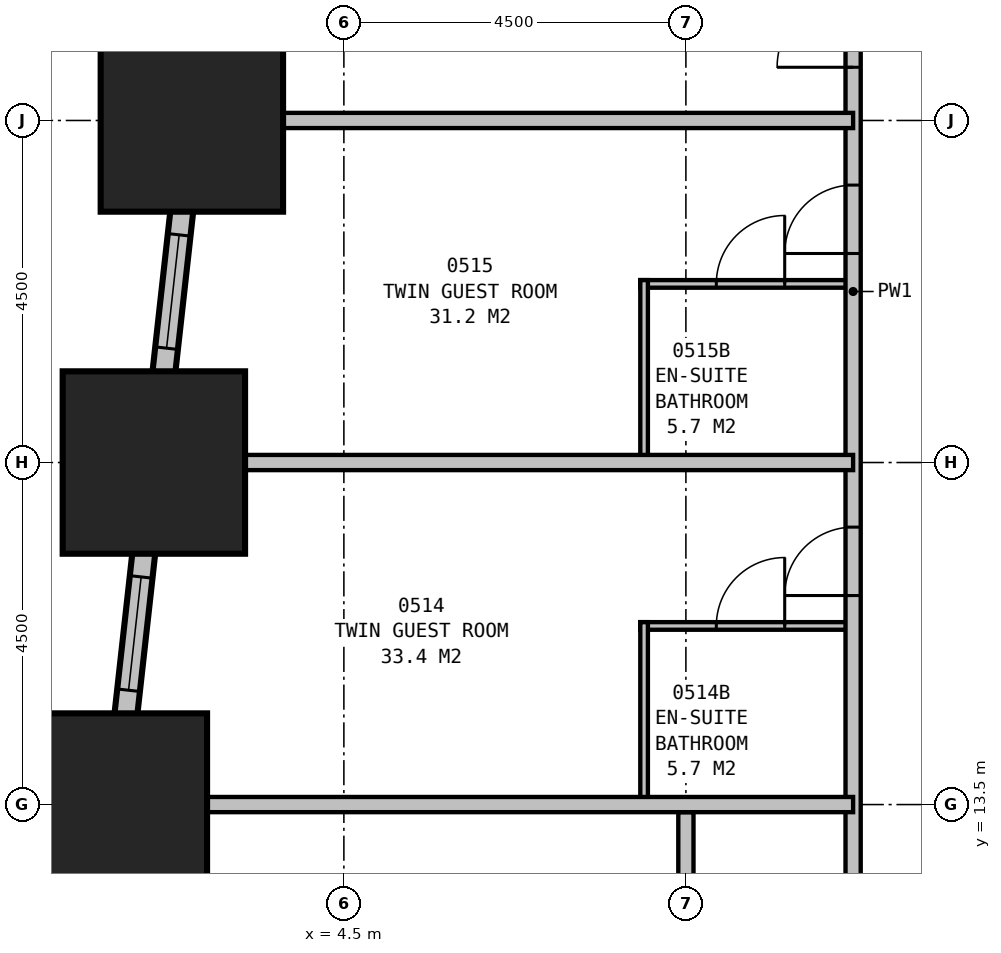
"""IFC4 building model, lengths in metres.
Left out: names, types, materials, properties, quantities, classifications, styles, units other than length and angle.
Written with IfcOpenShell. Run it as: python <this file> out.ifc"""

import sys

from ifc_helpers import new_model, si_unit, direction, frame, frame_2d, origin, origin_2d, place, context, subcontext, project, spatial, rectangle, extrude, element, fill, save


model = new_model("IFC4")
c1 = context("Model", 3, precision=1e-05, world=origin(), true_north=direction((0.0, 1.0)))
c2 = subcontext(c1, "Body", "Model", "MODEL_VIEW")
j1 = project(units=[si_unit("LENGTHUNIT", "METRE"), si_unit("PLANEANGLEUNIT", "RADIAN")], contexts=[c1])
p1 = place(None, origin())
s1 = spatial("IfcSite", under=j1, at=p1, CompositionType="ELEMENT")
p2 = place(p1, origin())
s2 = spatial("IfcBuilding", under=s1, at=p2, CompositionType="ELEMENT")
p3 = place(p2, frame((0.0, 0.0, 29.7)))
s3 = spatial("IfcBuildingStorey", under=s2, at=p3, CompositionType="ELEMENT", Elevation=29.7)
for number, where, z_axis, x_axis in (
    (1, (2.5, 22.5, 0.0), (0.0, 0.0, 1.0), (1.0, 0.0, 0.0)),
    (2, (2.0, 18.0, 0.0), (0.0, 0.0, 1.0), (1.0, 0.0, 0.0)),
    (3, (1.5, 13.5, 0.0), (0.0, 0.0, 1.0), (1.0, 0.0, 0.0)),
):
    element("IfcColumn", number, at=place(p3, frame(where, z_axis=z_axis, x_axis=x_axis)), inside=s3, PredefinedType="COLUMN", context=c2, shape_type="SweptSolid", body=[
        extrude(rectangle(XDim=2.4, YDim=2.4, at=origin_2d()), origin(), (0.0, 0.0, 1.0), 3.5),
    ])
p4 = place(p3, frame((4.017, 36.149, 0.0), z_axis=(0.0, 0.0, 1.0), x_axis=(-0.110433201132, -0.993883548555, 0.0)))
e4 = element("IfcWall", 4, at=p4, inside=s3, PredefinedType="STANDARD", context=c2, shape_type="SweptSolid", body=[
    extrude(rectangle(XDim=31.994, YDim=0.3, at=frame_2d((15.997, 0.0))), origin(), (0.0, 0.0, 1.0), 2.05),
])
p5 = place(p4, frame((1.664, 0.0, 0.5)))
e5 = element("IfcOpeningElement", 5, at=p5, cuts=e4, PredefinedType="OPENING", context=c2, shape_type="SweptSolid", body=[
    extrude(rectangle(XDim=1.5, YDim=1.4, at=frame_2d((0.75, 0.7))), frame((0.0, 0.16, 0.0), z_axis=(0.0, -1.0, 0.0), x_axis=(1.0, 0.0, 0.0)), (0.0, 0.0, 1.0), 0.32),
])
p6 = place(p4, frame((6.192, 0.0, 0.5)))
e6 = element("IfcOpeningElement", 6, at=p6, cuts=e4, PredefinedType="OPENING", context=c2, shape_type="SweptSolid", body=[
    extrude(rectangle(XDim=1.5, YDim=1.4, at=frame_2d((0.75, 0.7))), frame((0.0, 0.16, 0.0), z_axis=(0.0, -1.0, 0.0), x_axis=(1.0, 0.0, 0.0)), (0.0, 0.0, 1.0), 0.32),
])
p7 = place(p4, frame((10.719, 0.0, 0.5)))
e7 = element("IfcOpeningElement", 7, at=p7, cuts=e4, PredefinedType="OPENING", context=c2, shape_type="SweptSolid", body=[
    extrude(rectangle(XDim=1.5, YDim=1.4, at=frame_2d((0.75, 0.7))), frame((0.0, 0.16, 0.0), z_axis=(0.0, -1.0, 0.0), x_axis=(1.0, 0.0, 0.0)), (0.0, 0.0, 1.0), 0.32),
])
p8 = place(p4, frame((15.247, 0.0, 0.5)))
e8 = element("IfcOpeningElement", 8, at=p8, cuts=e4, PredefinedType="OPENING", context=c2, shape_type="SweptSolid", body=[
    extrude(rectangle(XDim=1.5, YDim=1.4, at=frame_2d((0.75, 0.7))), frame((0.0, 0.16, 0.0), z_axis=(0.0, -1.0, 0.0), x_axis=(1.0, 0.0, 0.0)), (0.0, 0.0, 1.0), 0.32),
])
p9 = place(p4, frame((19.775, 0.0, 0.5)))
e9 = element("IfcOpeningElement", 9, at=p9, cuts=e4, PredefinedType="OPENING", context=c2, shape_type="SweptSolid", body=[
    extrude(rectangle(XDim=1.5, YDim=1.4, at=frame_2d((0.75, 0.7))), frame((0.0, 0.16, 0.0), z_axis=(0.0, -1.0, 0.0), x_axis=(1.0, 0.0, 0.0)), (0.0, 0.0, 1.0), 0.32),
])
p10 = place(p4, frame((24.302, 0.0, 0.5)))
e10 = element("IfcOpeningElement", 10, at=p10, cuts=e4, PredefinedType="OPENING", context=c2, shape_type="SweptSolid", body=[
    extrude(rectangle(XDim=1.5, YDim=1.4, at=frame_2d((0.75, 0.7))), frame((0.0, 0.16, 0.0), z_axis=(0.0, -1.0, 0.0), x_axis=(1.0, 0.0, 0.0)), (0.0, 0.0, 1.0), 0.32),
])
p11 = place(p4, frame((28.83, 0.0, 0.5)))
e11 = element("IfcOpeningElement", 11, at=p11, cuts=e4, PredefinedType="OPENING", context=c2, shape_type="SweptSolid", body=[
    extrude(rectangle(XDim=1.5, YDim=1.4, at=frame_2d((0.75, 0.7))), frame((0.0, 0.16, 0.0), z_axis=(0.0, -1.0, 0.0), x_axis=(1.0, 0.0, 0.0)), (0.0, 0.0, 1.0), 0.32),
])
p12 = place(p3, frame((11.2, 11.2, 0.0), z_axis=(0.0, 0.0, 1.0), x_axis=(0.0, 1.0, 0.0)))
e12 = element("IfcWall", 12, at=p12, inside=s3, PredefinedType="PARTITIONING", context=c2, shape_type="SweptSolid", body=[
    extrude(rectangle(XDim=18.1, YDim=0.2, at=frame_2d((9.05, 0.0))), origin(), (0.0, 0.0, 1.0), 3.25),
])
p13 = place(p12, frame((5.05, 0.0, 0.0)))
e13 = element("IfcOpeningElement", 13, at=p13, cuts=e12, PredefinedType="OPENING", context=c2, shape_type="SweptSolid", body=[
    extrude(rectangle(XDim=0.9, YDim=2.1, at=frame_2d((0.45, 1.05))), frame((0.0, 0.11, 0.0), z_axis=(0.0, -1.0, 0.0), x_axis=(1.0, 0.0, 0.0)), (0.0, 0.0, 1.0), 0.22),
])
p14 = place(p12, frame((9.55, 0.0, 0.0)))
e14 = element("IfcOpeningElement", 14, at=p14, cuts=e12, PredefinedType="OPENING", context=c2, shape_type="SweptSolid", body=[
    extrude(rectangle(XDim=0.9, YDim=2.1, at=frame_2d((0.45, 1.05))), frame((0.0, 0.11, 0.0), z_axis=(0.0, -1.0, 0.0), x_axis=(1.0, 0.0, 0.0)), (0.0, 0.0, 1.0), 0.22),
])
p15 = place(p12, frame((12.0, 0.0, 0.0)))
e15 = element("IfcOpeningElement", 15, at=p15, cuts=e12, PredefinedType="OPENING", context=c2, shape_type="SweptSolid", body=[
    extrude(rectangle(XDim=1.0, YDim=2.1, at=frame_2d((0.5, 1.05))), frame((0.0, 0.11, 0.0), z_axis=(0.0, -1.0, 0.0), x_axis=(1.0, 0.0, 0.0)), (0.0, 0.0, 1.0), 0.22),
])
p16 = place(p3, frame((11.2, 18.0, 0.0), z_axis=(0.0, 0.0, 1.0), x_axis=(-1.0, 0.0, 0.0)))
e16 = element("IfcWall", 16, at=p16, inside=s3, PredefinedType="PARTITIONING", context=c2, shape_type="SweptSolid", body=[
    extrude(rectangle(XDim=9.199, YDim=0.2, at=frame_2d((4.6, 0.0))), origin(), (0.0, 0.0, 1.0), 2.25),
])
p17 = place(p3, frame((11.2, 22.5, 0.0), z_axis=(0.0, 0.0, 1.0), x_axis=(-1.0, 0.0, 0.0)))
e17 = element("IfcWall", 17, at=p17, inside=s3, PredefinedType="PARTITIONING", context=c2, shape_type="SweptSolid", body=[
    extrude(rectangle(XDim=8.699, YDim=0.2, at=frame_2d((4.35, 0.0))), origin(), (0.0, 0.0, 1.0), 2.25),
])
p18 = place(p3, frame((8.45, 13.5, 0.0), z_axis=(0.0, 0.0, 1.0), x_axis=(0.0, 1.0, 0.0)))
e18 = element("IfcWall", 18, at=p18, inside=s3, PredefinedType="PLUMBINGWALL", context=c2, shape_type="SweptSolid", body=[
    extrude(rectangle(XDim=2.4, YDim=0.1, at=frame_2d((1.2, 0.0))), origin(), (0.0, 0.0, 1.0), 3.25),
])
p19 = place(p3, frame((11.2, 15.85, 0.0), z_axis=(0.0, 0.0, 1.0), x_axis=(-1.0, 0.0, 0.0)))
e19 = element("IfcWall", 19, at=p19, inside=s3, PredefinedType="PLUMBINGWALL", context=c2, shape_type="SweptSolid", body=[
    extrude(rectangle(XDim=2.8, YDim=0.1, at=frame_2d((1.4, 0.0))), origin(), (0.0, 0.0, 1.0), 3.25),
])
p20 = place(p19, frame((1.8, 0.0, 0.0), z_axis=(0.0, 0.0, 1.0), x_axis=(-1.0, 0.0, 0.0)))
e20 = element("IfcOpeningElement", 20, at=p20, cuts=e19, PredefinedType="OPENING", context=c2, shape_type="SweptSolid", body=[
    extrude(rectangle(XDim=0.9, YDim=2.1, at=frame_2d((0.45, 1.05))), frame((0.0, 0.06, 0.0), z_axis=(0.0, -1.0, 0.0), x_axis=(1.0, 0.0, 0.0)), (0.0, 0.0, 1.0), 0.12),
])
p21 = place(p3, frame((8.45, 18.0, 0.0), z_axis=(0.0, 0.0, 1.0), x_axis=(0.0, 1.0, 0.0)))
e21 = element("IfcWall", 21, at=p21, inside=s3, PredefinedType="PLUMBINGWALL", context=c2, shape_type="SweptSolid", body=[
    extrude(rectangle(XDim=2.4, YDim=0.1, at=frame_2d((1.2, 0.0))), origin(), (0.0, 0.0, 1.0), 3.25),
])
p22 = place(p3, frame((11.2, 20.35, 0.0), z_axis=(0.0, 0.0, 1.0), x_axis=(-1.0, 0.0, 0.0)))
e22 = element("IfcWall", 22, at=p22, inside=s3, PredefinedType="PLUMBINGWALL", context=c2, shape_type="SweptSolid", body=[
    extrude(rectangle(XDim=2.8, YDim=0.1, at=frame_2d((1.4, 0.0))), origin(), (0.0, 0.0, 1.0), 3.25),
])
p23 = place(p22, frame((1.8, 0.0, 0.0), z_axis=(0.0, 0.0, 1.0), x_axis=(-1.0, 0.0, 0.0)))
e23 = element("IfcOpeningElement", 23, at=p23, cuts=e22, PredefinedType="OPENING", context=c2, shape_type="SweptSolid", body=[
    extrude(rectangle(XDim=0.9, YDim=2.1, at=frame_2d((0.45, 1.05))), frame((0.0, 0.06, 0.0), z_axis=(0.0, -1.0, 0.0), x_axis=(1.0, 0.0, 0.0)), (0.0, 0.0, 1.0), 0.12),
])
p24 = place(p3, frame((11.2, 13.5, 0.0), z_axis=(0.0, 0.0, 1.0), x_axis=(-1.0, 0.0, 0.0)))
e24 = element("IfcWall", 24, at=p24, inside=s3, PredefinedType="PARTITIONING", context=c2, shape_type="SweptSolid", body=[
    extrude(rectangle(XDim=9.921, YDim=0.2, at=frame_2d((4.96, 0.0))), origin(), (0.0, 0.0, 1.0), 1.95),
])
p25 = place(p3, frame((9.0, 4.6, 0.0), z_axis=(0.0, 0.0, 1.0), x_axis=(0.0, 1.0, 0.0)))
e25 = element("IfcWall", 25, at=p25, inside=s3, PredefinedType="PARTITIONING", context=c2, shape_type="SweptSolid", body=[
    extrude(rectangle(XDim=8.8, YDim=0.2, at=frame_2d((4.4, 0.0))), origin(), (0.0, 0.0, 1.0), 2.25),
])
p26 = place(p25, frame((4.05, 0.0, 0.0)))
e26 = element("IfcOpeningElement", 26, at=p26, cuts=e25, PredefinedType="OPENING", context=c2, shape_type="SweptSolid", body=[
    extrude(rectangle(XDim=0.9, YDim=2.1, at=frame_2d((0.45, 1.05))), frame((0.0, 0.11, 0.0), z_axis=(0.0, -1.0, 0.0), x_axis=(1.0, 0.0, 0.0)), (0.0, 0.0, 1.0), 0.22),
])
p27 = place(p8, origin())
e27 = element("IfcWindow", 27, at=p27, inside=s3, PartitioningType="SINGLE_PANEL", PredefinedType="WINDOW", context=c2, shape_type="SweptSolid", body=[
    extrude(rectangle(XDim=1.5, YDim=1.4, at=frame_2d((0.75, 0.7))), frame((0.0, 0.03, 0.0), z_axis=(0.0, -1.0, 0.0), x_axis=(1.0, 0.0, 0.0)), (0.0, 0.0, 1.0), 0.06),
])
fill(e8, e27)
p28 = place(p9, origin())
e28 = element("IfcWindow", 28, at=p28, inside=s3, PartitioningType="SINGLE_PANEL", PredefinedType="WINDOW", context=c2, shape_type="SweptSolid", body=[
    extrude(rectangle(XDim=1.5, YDim=1.4, at=frame_2d((0.75, 0.7))), frame((0.0, 0.03, 0.0), z_axis=(0.0, -1.0, 0.0), x_axis=(1.0, 0.0, 0.0)), (0.0, 0.0, 1.0), 0.06),
])
fill(e9, e28)
p29 = place(p13, origin())
e29 = element("IfcDoor", 29, at=p29, inside=s3, OperationType="SINGLE_SWING_LEFT", PredefinedType="DOOR", context=c2, shape_type="SweptSolid", body=[
    extrude(rectangle(XDim=0.9, YDim=2.1, at=frame_2d((0.45, 1.05))), frame((0.0, 0.025, 0.0), z_axis=(0.0, -1.0, 0.0), x_axis=(1.0, 0.0, 0.0)), (0.0, 0.0, 1.0), 0.05),
])
fill(e13, e29)
p30 = place(p14, origin())
e30 = element("IfcDoor", 30, at=p30, inside=s3, OperationType="SINGLE_SWING_LEFT", PredefinedType="DOOR", context=c2, shape_type="SweptSolid", body=[
    extrude(rectangle(XDim=0.9, YDim=2.1, at=frame_2d((0.45, 1.05))), frame((0.0, 0.025, 0.0), z_axis=(0.0, -1.0, 0.0), x_axis=(1.0, 0.0, 0.0)), (0.0, 0.0, 1.0), 0.05),
])
fill(e14, e30)
p31 = place(p15, origin())
e31 = element("IfcDoor", 31, at=p31, inside=s3, OperationType="SINGLE_SWING_LEFT", PredefinedType="DOOR", context=c2, shape_type="SweptSolid", body=[
    extrude(rectangle(XDim=1.0, YDim=2.1, at=frame_2d((0.5, 1.05))), frame((0.0, 0.025, 0.0), z_axis=(0.0, -1.0, 0.0), x_axis=(1.0, 0.0, 0.0)), (0.0, 0.0, 1.0), 0.05),
])
fill(e15, e31)
p32 = place(p20, origin())
e32 = element("IfcDoor", 32, at=p32, inside=s3, OperationType="SINGLE_SWING_RIGHT", PredefinedType="DOOR", context=c2, shape_type="SweptSolid", body=[
    extrude(rectangle(XDim=0.9, YDim=2.1, at=frame_2d((0.45, 1.05))), frame((0.0, 0.025, 0.0), z_axis=(0.0, -1.0, 0.0), x_axis=(1.0, 0.0, 0.0)), (0.0, 0.0, 1.0), 0.05),
])
fill(e20, e32)
p33 = place(p23, origin())
e33 = element("IfcDoor", 33, at=p33, inside=s3, OperationType="SINGLE_SWING_RIGHT", PredefinedType="DOOR", context=c2, shape_type="SweptSolid", body=[
    extrude(rectangle(XDim=0.9, YDim=2.1, at=frame_2d((0.45, 1.05))), frame((0.0, 0.025, 0.0), z_axis=(0.0, -1.0, 0.0), x_axis=(1.0, 0.0, 0.0)), (0.0, 0.0, 1.0), 0.05),
])
fill(e23, e33)
save(model, sys.argv[1])
